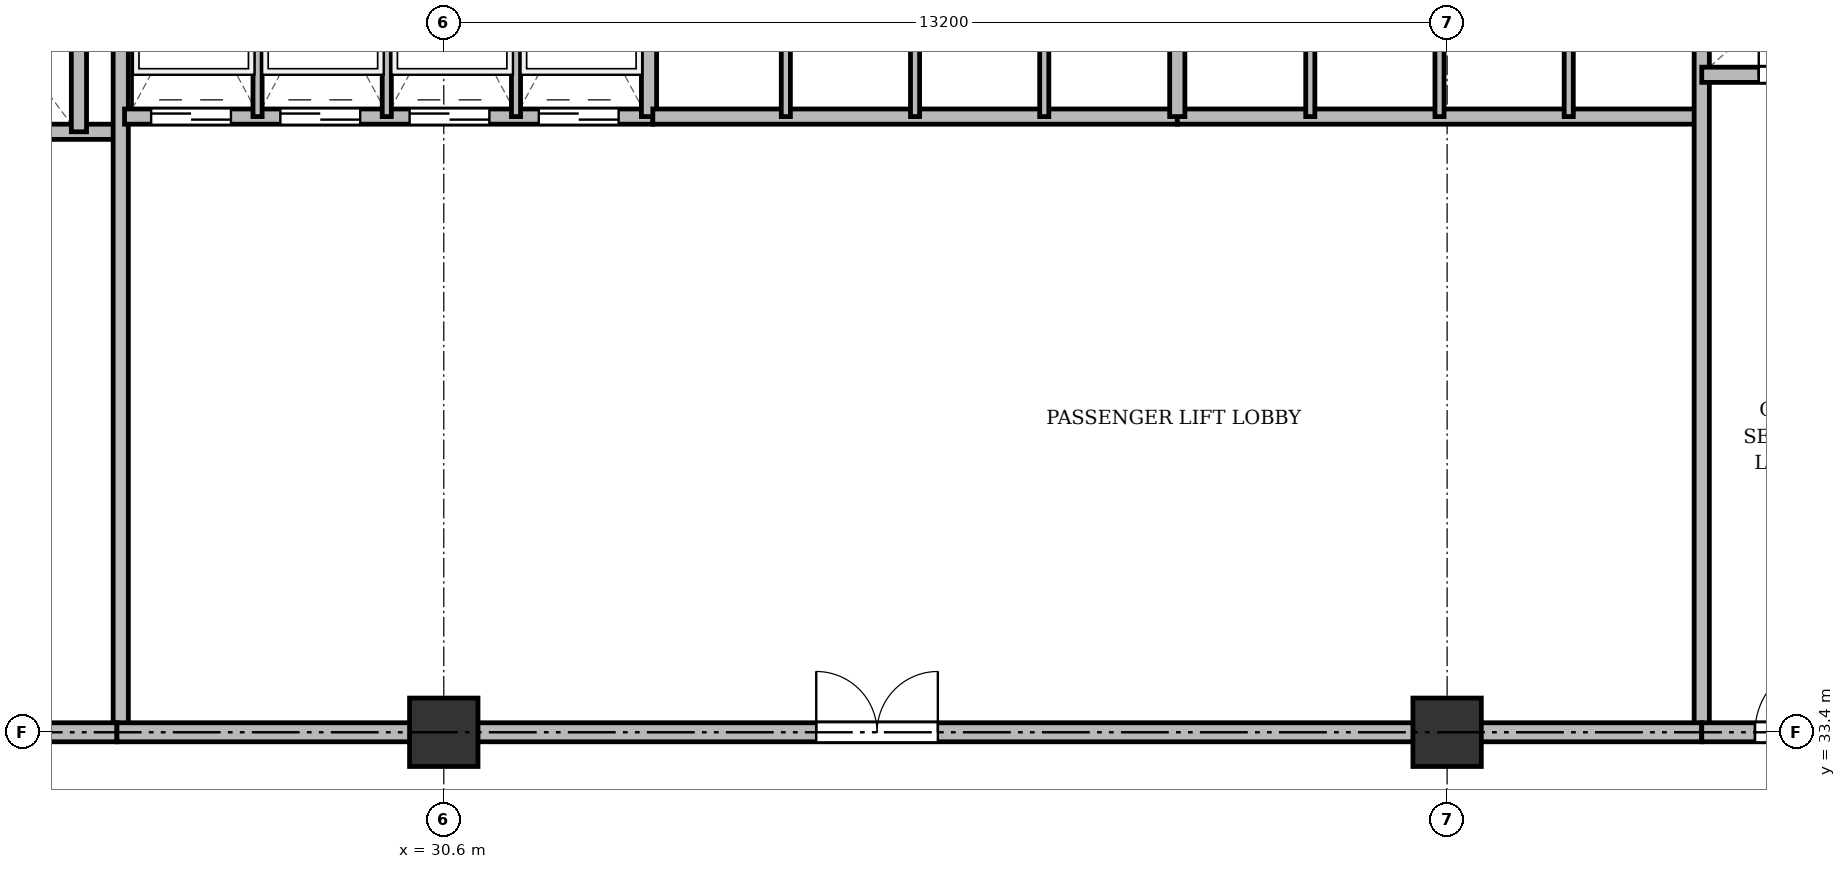
"""IFC4 building model, lengths in metres.
Left out: names, types, materials, properties, quantities, classifications, styles, units other than length and angle.
Written with IfcOpenShell. Run it as: python <this file> out.ifc"""

import sys

from ifc_helpers import new_model, si_unit, direction, frame, frame_2d, origin, origin_2d, place, context, subcontext, project, spatial, rectangle, extrude, source, transform, mapped, element, fill, save


model = new_model("IFC4")
c1 = context("Model", 3, precision=1e-05, world=origin(), true_north=direction((0.0, 1.0)))
c2 = subcontext(c1, "Body", "Model", "MODEL_VIEW")
j1 = project(units=[si_unit("LENGTHUNIT", "METRE"), si_unit("PLANEANGLEUNIT", "RADIAN")], contexts=[c1])
p1 = place(None, origin())
s1 = spatial("IfcSite", under=j1, at=p1, CompositionType="ELEMENT")
p2 = place(p1, origin())
s2 = spatial("IfcBuilding", under=s1, at=p2, CompositionType="ELEMENT")
p3 = place(p2, frame((0.0, 0.0, 73.9)))
s3 = spatial("IfcBuildingStorey", under=s2, at=p3, CompositionType="ELEMENT", Elevation=73.9)
m1 = source(origin(), c2, "Body", "SweptSolid", [
    extrude(rectangle(XDim=0.9, YDim=0.9, at=origin_2d()), origin(), (0.0, 0.0, 1.0), 7.8),
])
for number, where, z_axis, x_axis in (
    (1, (30.6, 33.4, 0.0), (0.0, 0.0, 1.0), (1.0, 0.0, 0.0)),
    (2, (43.8, 33.4, 0.0), (0.0, 0.0, 1.0), (1.0, 0.0, 0.0)),
):
    element("IfcColumn", number, at=place(p3, frame(where, z_axis=z_axis, x_axis=x_axis)), inside=s3, PredefinedType="COLUMN", context=c2, shape_type="MappedRepresentation", body=[
        mapped(m1, transform((0.0, 0.0, 0.0), x_axis=(1.0, 0.0, 0.0), y_axis=(0.0, 1.0, 0.0), z_axis=(0.0, 0.0, 1.0), scale=1.0)),
    ])
p4 = place(p3, frame((19.55, 41.3, 0.0), z_axis=(0.0, 0.0, 1.0), x_axis=(1.0, 0.0, 0.0)))
e3 = element("IfcWall", 3, at=p4, inside=s3, PredefinedType="SOLIDWALL", context=c2, shape_type="SweptSolid", body=[
    extrude(rectangle(XDim=6.75, YDim=0.2, at=frame_2d((3.375, 0.0))), origin(), (0.0, 0.0, 1.0), 7.42),
])
p5 = place(p4, frame((1.7, 0.0, 0.0)))
e4 = element("IfcOpeningElement", 4, at=p5, cuts=e3, PredefinedType="OPENING", context=c2, shape_type="SweptSolid", body=[
    extrude(rectangle(XDim=1.1, YDim=2.15, at=frame_2d((0.55, 1.075))), frame((0.0, 0.11, 0.0), z_axis=(0.0, -1.0, 0.0), x_axis=(1.0, 0.0, 0.0)), (0.0, 0.0, 1.0), 0.22),
])
p6 = place(p4, frame((4.4, 0.0, 0.0)))
e5 = element("IfcOpeningElement", 5, at=p6, cuts=e3, PredefinedType="OPENING", context=c2, shape_type="SweptSolid", body=[
    extrude(rectangle(XDim=1.1, YDim=2.15, at=frame_2d((0.55, 1.075))), frame((0.0, 0.11, 0.0), z_axis=(0.0, -1.0, 0.0), x_axis=(1.0, 0.0, 0.0)), (0.0, 0.0, 1.0), 0.22),
])
p7 = place(p3, frame((25.8, 41.3, 0.0), z_axis=(0.0, 0.0, 1.0), x_axis=(0.0, 1.0, 0.0)))
e6 = element("IfcWall", 6, at=p7, inside=s3, PredefinedType="SOLIDWALL", context=c2, shape_type="SweptSolid", body=[
    extrude(rectangle(XDim=3.4, YDim=0.2, at=frame_2d((1.7, 0.0))), origin(), (0.0, 0.0, 1.0), 7.42),
])
p8 = place(p3, frame((26.35, 33.4, 0.0), z_axis=(0.0, 0.0, 1.0), x_axis=(0.0, 1.0, 0.0)))
e7 = element("IfcWall", 7, at=p8, inside=s3, PredefinedType="SOLIDWALL", context=c2, shape_type="SweptSolid", body=[
    extrude(rectangle(XDim=11.3, YDim=0.2, at=frame_2d((5.65, 0.0))), origin(), (0.0, 0.0, 1.0), 6.77),
])
p9 = place(p3, frame((19.5, 33.4, 0.0), z_axis=(0.0, 0.0, 1.0), x_axis=(1.0, 0.0, 0.0)))
e8 = element("IfcWall", 8, at=p9, inside=s3, PredefinedType="PARTITIONING", context=c2, shape_type="SweptSolid", body=[
    extrude(rectangle(XDim=6.8, YDim=0.25, at=frame_2d((3.4, 0.0))), origin(), (0.0, 0.0, 1.0), 6.77),
])
p10 = place(p9, frame((0.75, 0.0, 0.0)))
e9 = element("IfcOpeningElement", 9, at=p10, cuts=e8, PredefinedType="OPENING", context=c2, shape_type="SweptSolid", body=[
    extrude(rectangle(XDim=1.6, YDim=2.2, at=frame_2d((0.8, 1.1))), frame((0.0, 0.135, 0.0), z_axis=(0.0, -1.0, 0.0), x_axis=(1.0, 0.0, 0.0)), (0.0, 0.0, 1.0), 0.27),
])
p11 = place(p3, frame((26.4, 41.5, 0.0), z_axis=(0.0, 0.0, 1.0), x_axis=(1.0, 0.0, 0.0)))
e10 = element("IfcWall", 10, at=p11, inside=s3, PredefinedType="SOLIDWALL", context=c2, shape_type="SweptSolid", body=[
    extrude(rectangle(XDim=6.95, YDim=0.2, at=frame_2d((3.475, 0.0))), origin(), (0.0, 0.0, 1.0), 7.42),
])
p12 = place(p11, frame((0.35, 0.0, 0.0)))
e11 = element("IfcOpeningElement", 11, at=p12, cuts=e10, PredefinedType="OPENING", context=c2, shape_type="SweptSolid", body=[
    extrude(rectangle(XDim=1.05, YDim=2.15, at=frame_2d((0.525, 1.075))), frame((0.0, 0.11, 0.0), z_axis=(0.0, -1.0, 0.0), x_axis=(1.0, 0.0, 0.0)), (0.0, 0.0, 1.0), 0.22),
])
p13 = place(p11, frame((2.05, 0.0, 0.0)))
e12 = element("IfcOpeningElement", 12, at=p13, cuts=e10, PredefinedType="OPENING", context=c2, shape_type="SweptSolid", body=[
    extrude(rectangle(XDim=1.05, YDim=2.15, at=frame_2d((0.525, 1.075))), frame((0.0, 0.11, 0.0), z_axis=(0.0, -1.0, 0.0), x_axis=(1.0, 0.0, 0.0)), (0.0, 0.0, 1.0), 0.22),
])
p14 = place(p11, frame((3.75, 0.0, 0.0)))
e13 = element("IfcOpeningElement", 13, at=p14, cuts=e10, PredefinedType="OPENING", context=c2, shape_type="SweptSolid", body=[
    extrude(rectangle(XDim=1.05, YDim=2.15, at=frame_2d((0.525, 1.075))), frame((0.0, 0.11, 0.0), z_axis=(0.0, -1.0, 0.0), x_axis=(1.0, 0.0, 0.0)), (0.0, 0.0, 1.0), 0.22),
])
p15 = place(p11, frame((5.45, 0.0, 0.0)))
e14 = element("IfcOpeningElement", 14, at=p15, cuts=e10, PredefinedType="OPENING", context=c2, shape_type="SweptSolid", body=[
    extrude(rectangle(XDim=1.05, YDim=2.15, at=frame_2d((0.525, 1.075))), frame((0.0, 0.11, 0.0), z_axis=(0.0, -1.0, 0.0), x_axis=(1.0, 0.0, 0.0)), (0.0, 0.0, 1.0), 0.22),
])
p16 = place(p3, frame((33.3, 41.5, 0.0), z_axis=(0.0, 0.0, 1.0), x_axis=(0.0, 1.0, 0.0)))
e15 = element("IfcWall", 15, at=p16, inside=s3, PredefinedType="SOLIDWALL", context=c2, shape_type="SweptSolid", body=[
    extrude(rectangle(XDim=3.2, YDim=0.2, at=frame_2d((1.6, 0.0))), origin(), (0.0, 0.0, 1.0), 7.42),
])
for number, where, z_axis, x_axis in (
    (16, (28.15, 41.5, 0.0), (0.0, 0.0, 1.0), (0.0, 1.0, 0.0)),
    (17, (29.85, 41.5, 0.0), (0.0, 0.0, 1.0), (0.0, 1.0, 0.0)),
    (18, (31.55, 41.5, 0.0), (0.0, 0.0, 1.0), (0.0, 1.0, 0.0)),
):
    element("IfcWall", number, at=place(p3, frame(where, z_axis=z_axis, x_axis=x_axis)), inside=s3, PredefinedType="PARTITIONING", context=c2, shape_type="SweptSolid", body=[
        extrude(rectangle(XDim=3.2, YDim=0.12, at=frame_2d((1.6, 0.0))), origin(), (0.0, 0.0, 1.0), 7.42),
    ])
p17 = place(p3, frame((33.35, 41.5, 0.0), z_axis=(0.0, 0.0, 1.0), x_axis=(1.0, 0.0, 0.0)))
e19 = element("IfcWall", 19, at=p17, inside=s3, PredefinedType="SOLIDWALL", context=c2, shape_type="SweptSolid", body=[
    extrude(rectangle(XDim=6.9, YDim=0.2, at=frame_2d((3.45, 0.0))), origin(), (0.0, 0.0, 1.0), 7.42),
])
for number, where, z_axis, x_axis in (
    (20, (35.1, 41.5, 0.0), (0.0, 0.0, 1.0), (0.0, 1.0, 0.0)),
    (21, (36.8, 41.5, 0.0), (0.0, 0.0, 1.0), (0.0, 1.0, 0.0)),
    (22, (38.5, 41.5, 0.0), (0.0, 0.0, 1.0), (0.0, 1.0, 0.0)),
):
    element("IfcWall", number, at=place(p3, frame(where, z_axis=z_axis, x_axis=x_axis)), inside=s3, PredefinedType="PARTITIONING", context=c2, shape_type="SweptSolid", body=[
        extrude(rectangle(XDim=3.2, YDim=0.12, at=frame_2d((1.6, 0.0))), origin(), (0.0, 0.0, 1.0), 7.42),
    ])
p18 = place(p3, frame((40.25, 41.5, 0.0), z_axis=(0.0, 0.0, 1.0), x_axis=(1.0, 0.0, 0.0)))
e23 = element("IfcWall", 23, at=p18, inside=s3, PredefinedType="SOLIDWALL", context=c2, shape_type="SweptSolid", body=[
    extrude(rectangle(XDim=6.9, YDim=0.2, at=frame_2d((3.45, 0.0))), origin(), (0.0, 0.0, 1.0), 6.832),
])
p19 = place(p3, frame((40.25, 41.5, 0.0), z_axis=(0.0, 0.0, 1.0), x_axis=(0.0, 1.0, 0.0)))
e24 = element("IfcWall", 24, at=p19, inside=s3, PredefinedType="SOLIDWALL", context=c2, shape_type="SweptSolid", body=[
    extrude(rectangle(XDim=3.2, YDim=0.2, at=frame_2d((1.6, 0.0))), origin(), (0.0, 0.0, 1.0), 7.42),
])
p20 = place(p3, frame((42.0, 41.5, 0.0), z_axis=(0.0, 0.0, 1.0), x_axis=(0.0, 1.0, 0.0)))
e25 = element("IfcWall", 25, at=p20, inside=s3, PredefinedType="PARTITIONING", context=c2, shape_type="SweptSolid", body=[
    extrude(rectangle(XDim=3.2, YDim=0.12, at=frame_2d((1.6, 0.0))), origin(), (0.0, 0.0, 1.0), 7.42),
])
p21 = place(p3, frame((43.7, 41.5, 0.0), z_axis=(0.0, 0.0, 1.0), x_axis=(0.0, 1.0, 0.0)))
e26 = element("IfcWall", 26, at=p21, inside=s3, PredefinedType="PARTITIONING", context=c2, shape_type="SweptSolid", body=[
    extrude(rectangle(XDim=3.2, YDim=0.12, at=frame_2d((1.6, 0.0))), origin(), (0.0, 0.0, 1.0), 6.832),
])
p22 = place(p3, frame((45.4, 41.5, 0.0), z_axis=(0.0, 0.0, 1.0), x_axis=(0.0, 1.0, 0.0)))
e27 = element("IfcWall", 27, at=p22, inside=s3, PredefinedType="PARTITIONING", context=c2, shape_type="SweptSolid", body=[
    extrude(rectangle(XDim=3.2, YDim=0.12, at=frame_2d((1.6, 0.0))), origin(), (0.0, 0.0, 1.0), 7.42),
])
p23 = place(p3, frame((47.15, 33.4, 0.0), z_axis=(0.0, 0.0, 1.0), x_axis=(0.0, 1.0, 0.0)))
e28 = element("IfcWall", 28, at=p23, inside=s3, PredefinedType="SOLIDWALL", context=c2, shape_type="SweptSolid", body=[
    extrude(rectangle(XDim=11.3, YDim=0.2, at=frame_2d((5.65, 0.0))), origin(), (0.0, 0.0, 1.0), 6.77),
])
p24 = place(p3, frame((26.3, 33.4, 0.0), z_axis=(0.0, 0.0, 1.0), x_axis=(1.0, 0.0, 0.0)))
e29 = element("IfcWall", 29, at=p24, inside=s3, PredefinedType="PARTITIONING", context=c2, shape_type="SweptSolid", body=[
    extrude(rectangle(XDim=20.85, YDim=0.25, at=frame_2d((10.425, 0.0))), origin(), (0.0, 0.0, 1.0), 6.77),
])
p25 = place(p24, frame((9.2, 0.0, 0.0)))
e30 = element("IfcOpeningElement", 30, at=p25, cuts=e29, PredefinedType="OPENING", context=c2, shape_type="SweptSolid", body=[
    extrude(rectangle(XDim=1.6, YDim=2.2, at=frame_2d((0.8, 1.1))), frame((0.0, 0.135, 0.0), z_axis=(0.0, -1.0, 0.0), x_axis=(1.0, 0.0, 0.0)), (0.0, 0.0, 1.0), 0.27),
])
p26 = place(p3, frame((47.15, 42.05, 0.0), z_axis=(0.0, 0.0, 1.0), x_axis=(1.0, 0.0, 0.0)))
e31 = element("IfcWall", 31, at=p26, inside=s3, PredefinedType="SOLIDWALL", context=c2, shape_type="SweptSolid", body=[
    extrude(rectangle(XDim=7.85, YDim=0.2, at=frame_2d((3.925, 0.0))), origin(), (0.0, 0.0, 1.0), 6.832),
])
p27 = place(p26, frame((0.75, 0.0, 0.0)))
e32 = element("IfcOpeningElement", 32, at=p27, cuts=e31, PredefinedType="OPENING", context=c2, shape_type="SweptSolid", body=[
    extrude(rectangle(XDim=0.9, YDim=2.1, at=frame_2d((0.45, 1.05))), frame((0.0, 0.11, 0.0), z_axis=(0.0, -1.0, 0.0), x_axis=(1.0, 0.0, 0.0)), (0.0, 0.0, 1.0), 0.22),
])
p28 = place(p26, frame((3.85, 0.0, 0.0)))
e33 = element("IfcOpeningElement", 33, at=p28, cuts=e31, PredefinedType="OPENING", context=c2, shape_type="SweptSolid", body=[
    extrude(rectangle(XDim=0.9, YDim=2.1, at=frame_2d((0.45, 1.05))), frame((0.0, 0.11, 0.0), z_axis=(0.0, -1.0, 0.0), x_axis=(1.0, 0.0, 0.0)), (0.0, 0.0, 1.0), 0.22),
])
p29 = place(p3, frame((47.15, 33.4, 0.0), z_axis=(0.0, 0.0, 1.0), x_axis=(1.0, 0.0, 0.0)))
e34 = element("IfcWall", 34, at=p29, inside=s3, PredefinedType="PARTITIONING", context=c2, shape_type="SweptSolid", body=[
    extrude(rectangle(XDim=11.15, YDim=0.25, at=frame_2d((5.575, 0.0))), origin(), (0.0, 0.0, 1.0), 6.77),
])
p30 = place(p29, frame((0.7, 0.0, 0.0)))
e35 = element("IfcOpeningElement", 35, at=p30, cuts=e34, PredefinedType="OPENING", context=c2, shape_type="SweptSolid", body=[
    extrude(rectangle(XDim=0.95, YDim=2.15, at=frame_2d((0.475, 1.075))), frame((0.0, 0.135, 0.0), z_axis=(0.0, -1.0, 0.0), x_axis=(1.0, 0.0, 0.0)), (0.0, 0.0, 1.0), 0.27),
])
p31 = place(p29, frame((6.0, 0.0, 0.0)))
e36 = element("IfcOpeningElement", 36, at=p31, cuts=e34, PredefinedType="OPENING", context=c2, shape_type="SweptSolid", body=[
    extrude(rectangle(XDim=1.2, YDim=2.15, at=frame_2d((0.6, 1.075))), frame((0.0, 0.135, 0.0), z_axis=(0.0, -1.0, 0.0), x_axis=(1.0, 0.0, 0.0)), (0.0, 0.0, 1.0), 0.27),
])
m2 = source(origin(), c2, "Body", "SweptSolid", [
    extrude(rectangle(XDim=1.05, YDim=2.15, at=frame_2d((0.525, 1.075))), frame((0.0, 0.025, 0.0), z_axis=(0.0, -1.0, 0.0), x_axis=(1.0, 0.0, 0.0)), (0.0, 0.0, 1.0), 0.05),
])
p32 = place(p12, origin())
e37 = element("IfcDoor", 37, at=p32, inside=s3, OperationType="DOUBLE_DOOR_SLIDING", PredefinedType="DOOR", context=c2, shape_type="MappedRepresentation", body=[
    mapped(m2, transform((0.0, 0.0, 0.0), x_axis=(1.0, 0.0, 0.0), y_axis=(0.0, 1.0, 0.0), z_axis=(0.0, 0.0, 1.0), scale=1.0)),
])
fill(e11, e37)
p33 = place(p13, origin())
e38 = element("IfcDoor", 38, at=p33, inside=s3, OperationType="DOUBLE_DOOR_SLIDING", PredefinedType="DOOR", context=c2, shape_type="MappedRepresentation", body=[
    mapped(m2, transform((0.0, 0.0, 0.0), x_axis=(1.0, 0.0, 0.0), y_axis=(0.0, 1.0, 0.0), z_axis=(0.0, 0.0, 1.0), scale=1.0)),
])
fill(e12, e38)
p34 = place(p14, origin())
e39 = element("IfcDoor", 39, at=p34, inside=s3, OperationType="DOUBLE_DOOR_SLIDING", PredefinedType="DOOR", context=c2, shape_type="MappedRepresentation", body=[
    mapped(m2, transform((0.0, 0.0, 0.0), x_axis=(1.0, 0.0, 0.0), y_axis=(0.0, 1.0, 0.0), z_axis=(0.0, 0.0, 1.0), scale=1.0)),
])
fill(e13, e39)
p35 = place(p15, origin())
e40 = element("IfcDoor", 40, at=p35, inside=s3, OperationType="DOUBLE_DOOR_SLIDING", PredefinedType="DOOR", context=c2, shape_type="MappedRepresentation", body=[
    mapped(m2, transform((0.0, 0.0, 0.0), x_axis=(1.0, 0.0, 0.0), y_axis=(0.0, 1.0, 0.0), z_axis=(0.0, 0.0, 1.0), scale=1.0)),
])
fill(e14, e40)
m3 = source(origin(), c2, "Body", "SweptSolid", [
    extrude(rectangle(XDim=1.6, YDim=2.2, at=frame_2d((0.8, 1.1))), frame((0.0, 0.025, 0.0), z_axis=(0.0, -1.0, 0.0), x_axis=(1.0, 0.0, 0.0)), (0.0, 0.0, 1.0), 0.05),
])
p36 = place(p25, origin())
e41 = element("IfcDoor", 41, at=p36, inside=s3, OperationType="DOUBLE_DOOR_SINGLE_SWING", PredefinedType="DOOR", context=c2, shape_type="MappedRepresentation", body=[
    mapped(m3, transform((0.0, 0.0, 0.0), x_axis=(1.0, 0.0, 0.0), y_axis=(0.0, 1.0, 0.0), z_axis=(0.0, 0.0, 1.0), scale=1.0)),
])
fill(e30, e41)
m4 = source(origin(), c2, "Body", "SweptSolid", [
    extrude(rectangle(XDim=0.9, YDim=2.1, at=frame_2d((0.45, 1.05))), frame((0.0, 0.025, 0.0), z_axis=(0.0, -1.0, 0.0), x_axis=(1.0, 0.0, 0.0)), (0.0, 0.0, 1.0), 0.05),
])
p37 = place(p27, origin())
e42 = element("IfcDoor", 42, at=p37, inside=s3, OperationType="SINGLE_SWING_LEFT", PredefinedType="DOOR", context=c2, shape_type="MappedRepresentation", body=[
    mapped(m4, transform((0.0, 0.0, 0.0), x_axis=(1.0, 0.0, 0.0), y_axis=(0.0, 1.0, 0.0), z_axis=(0.0, 0.0, 1.0), scale=1.0)),
])
fill(e32, e42)
m5 = source(origin(), c2, "Body", "SweptSolid", [
    extrude(rectangle(XDim=0.95, YDim=2.15, at=frame_2d((0.475, 1.075))), frame((0.0, 0.025, 0.0), z_axis=(0.0, -1.0, 0.0), x_axis=(1.0, 0.0, 0.0)), (0.0, 0.0, 1.0), 0.05),
])
p38 = place(p30, origin())
e43 = element("IfcDoor", 43, at=p38, inside=s3, OperationType="SINGLE_SWING_RIGHT", PredefinedType="DOOR", context=c2, shape_type="MappedRepresentation", body=[
    mapped(m5, transform((0.0, 0.0, 0.0), x_axis=(1.0, 0.0, 0.0), y_axis=(0.0, 1.0, 0.0), z_axis=(0.0, 0.0, 1.0), scale=1.0)),
])
fill(e35, e43)
save(model, sys.argv[1])
